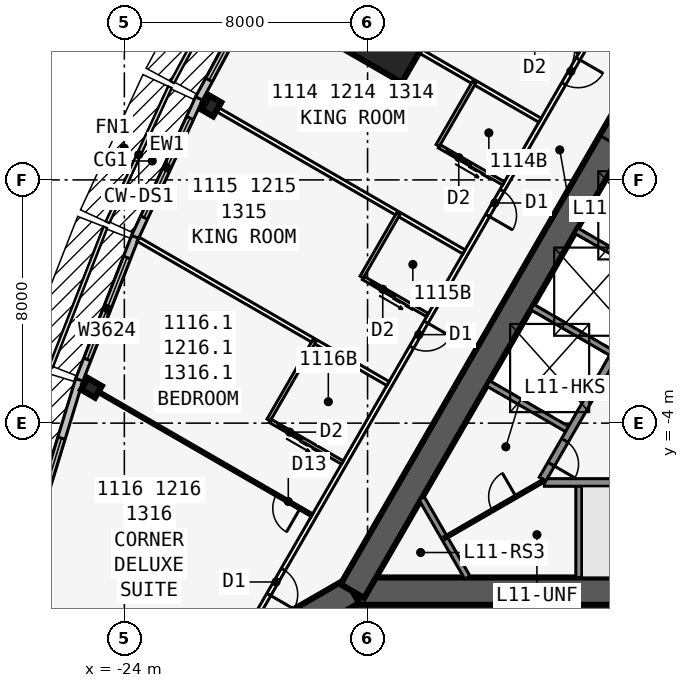
"""IFC4 building model, lengths in metres.
Left out: names, types, materials, properties, quantities, classifications, styles, units other than length and angle.
Written with IfcOpenShell. Run it as: python <this file> out.ifc"""

import sys

from ifc_helpers import new_model, si_unit, direction, frame, frame_2d, origin, origin_2d, place, context, subcontext, project, spatial, rectangle, i_section, extrude, element, fill, save


model = new_model("IFC4")
c1 = context("Model", 3, precision=1e-05, world=origin(), true_north=direction((0.0, 1.0)))
c2 = subcontext(c1, "Body", "Model", "MODEL_VIEW")
j1 = project(units=[si_unit("LENGTHUNIT", "METRE"), si_unit("PLANEANGLEUNIT", "RADIAN")], contexts=[c1])
p1 = place(None, origin())
s1 = spatial("IfcSite", under=j1, at=p1, CompositionType="ELEMENT")
p2 = place(p1, origin())
s2 = spatial("IfcBuilding", under=s1, at=p2, CompositionType="ELEMENT")
p3 = place(p2, frame((0.0, 0.0, 48.9)))
s3 = spatial("IfcBuildingStorey", under=s2, at=p3, CompositionType="ELEMENT", Elevation=48.9)
p4 = place(p3, frame((-16.5, -9.526, 0.0), z_axis=(0.0, 0.0, 1.0), x_axis=(1.0, 0.0, 0.0)))
e1 = element("IfcWall", 1, at=p4, inside=s3, PredefinedType="SHEAR", context=c2, shape_type="SweptSolid", body=[
    extrude(rectangle(XDim=33.0, YDim=0.9, at=frame_2d((16.5, 0.0))), origin(), (0.0, 0.0, 1.0), 3.4),
])
p5 = place(p4, frame((14.05, 0.0, 0.0)))
e2 = element("IfcOpeningElement", 2, at=p5, cuts=e1, PredefinedType="OPENING", context=c2, shape_type="SweptSolid", body=[
    extrude(rectangle(XDim=1.8, YDim=2.13, at=frame_2d((0.9, 1.065))), frame((0.0, 0.46, 0.0), z_axis=(0.0, -1.0, 0.0), x_axis=(1.0, 0.0, 0.0)), (0.0, 0.0, 1.0), 0.92),
])
p6 = place(p3, frame((-10.183, -5.951, 0.0), z_axis=(0.0, 0.0, 1.0), x_axis=(1.0, 0.0, 0.0)))
e3 = element("IfcWall", 3, at=p6, inside=s3, PredefinedType="SOLIDWALL", context=c2, shape_type="SweptSolid", body=[
    extrude(rectangle(XDim=7.633, YDim=0.25, at=frame_2d((3.816, 0.0))), origin(), (0.0, 0.0, 1.0), 3.235),
])
p7 = place(p3, frame((-9.05, -5.951, 0.0), z_axis=(0.0, 0.0, 1.0), x_axis=(0.0, -1.0, 0.0)))
e4 = element("IfcWall", 4, at=p7, inside=s3, PredefinedType="SOLIDWALL", context=c2, shape_type="SweptSolid", body=[
    extrude(rectangle(XDim=3.125, YDim=0.2, at=frame_2d((1.562, 0.0))), origin(), (0.0, 0.0, 1.0), 3.235),
])
p8 = place(p3, frame((0.0, 19.052, 0.0), z_axis=(0.0, 0.0, 1.0), x_axis=(-0.499999749417, -0.866025548458, 0.0)))
e5 = element("IfcWall", 5, at=p8, inside=s3, PredefinedType="SHEAR", context=c2, shape_type="SweptSolid", body=[
    extrude(rectangle(XDim=33.0, YDim=0.9, at=frame_2d((16.5, 0.0))), origin(), (0.0, 0.0, 1.0), 3.4),
])
p9 = place(p8, frame((14.15, 0.0, 0.0)))
e6 = element("IfcOpeningElement", 6, at=p9, cuts=e5, PredefinedType="OPENING", context=c2, shape_type="SweptSolid", body=[
    extrude(rectangle(XDim=1.8, YDim=2.13, at=frame_2d((0.9, 1.065))), frame((0.0, 0.46, 0.0), z_axis=(0.0, -1.0, 0.0), x_axis=(1.0, 0.0, 0.0)), (0.0, 0.0, 1.0), 0.92),
])
p10 = place(p8, frame((12.6, 0.0, 0.0)))
e7 = element("IfcOpeningElement", 7, at=p10, cuts=e5, PredefinedType="OPENING", context=c2, shape_type="SweptSolid", body=[
    extrude(rectangle(XDim=1.0, YDim=2.13, at=frame_2d((0.5, 1.065))), frame((0.0, 0.46, 0.0), z_axis=(0.0, -1.0, 0.0), x_axis=(1.0, 0.0, 0.0)), (0.0, 0.0, 1.0), 0.92),
])
p11 = place(p3, frame((-4.929, 3.365, 0.0), z_axis=(0.0, 0.0, 1.0), x_axis=(-0.499991433582, -0.866030349552, 0.0)))
e8 = element("IfcWall", 8, at=p11, inside=s3, PredefinedType="SOLIDWALL", context=c2, shape_type="SweptSolid", body=[
    extrude(rectangle(XDim=10.633, YDim=0.25, at=frame_2d((5.316, 0.0))), origin(), (0.0, 0.0, 1.0), 3.235),
])
p12 = place(p11, frame((9.164, 0.0, 0.0)))
e9 = element("IfcOpeningElement", 9, at=p12, cuts=e8, PredefinedType="OPENING", context=c2, shape_type="SweptSolid", body=[
    extrude(rectangle(XDim=0.9, YDim=2.13, at=frame_2d((0.45, 1.065))), frame((0.0, 0.135, 0.0), z_axis=(0.0, -1.0, 0.0), x_axis=(1.0, 0.0, 0.0)), (0.0, 0.0, 1.0), 0.27),
])
for number, where, z_axis, x_axis in (
    (10, (-6.429, 0.767, 0.0), (0.0, 0.0, 1.0), (-0.866, 0.5, 0.0)),
    (11, (-7.879, -1.744, 0.0), (0.0, 0.0, 1.0), (-0.866, 0.5, 0.0)),
    (12, (-9.329, -4.256, 0.0), (0.0, 0.0, 1.0), (-0.866, 0.5, 0.0)),
):
    element("IfcWall", number, at=place(p3, frame(where, z_axis=z_axis, x_axis=x_axis)), inside=s3, PredefinedType="SOLIDWALL", context=c2, shape_type="SweptSolid", body=[
        extrude(rectangle(XDim=3.125, YDim=0.2, at=frame_2d((1.562, 0.0))), origin(), (0.0, 0.0, 1.0), 3.235),
    ])
p13 = place(p3, frame((-16.5, -9.526, 0.0), z_axis=(0.0, 0.0, 1.0), x_axis=(-0.866031398331, -0.499989616998, 0.0)))
e13 = element("IfcWall", 13, at=p13, inside=s3, PredefinedType="SHEAR", context=c2, shape_type="SweptSolid", body=[
    extrude(rectangle(XDim=4.746, YDim=0.9, at=frame_2d((2.373, 0.0))), origin(), (0.0, 0.0, 1.0), 3.4),
])
p14 = place(p13, frame((1.8, 0.0, 0.0)))
e14 = element("IfcOpeningElement", 14, at=p14, cuts=e13, PredefinedType="OPENING", context=c2, shape_type="SweptSolid", body=[
    extrude(rectangle(XDim=1.8, YDim=2.13, at=frame_2d((0.9, 1.065))), frame((0.0, 0.46, 0.0), z_axis=(0.0, -1.0, 0.0), x_axis=(1.0, 0.0, 0.0)), (0.0, 0.0, 1.0), 0.92),
])
for number, where, z_axis, x_axis in (
    (15, (-21.137, 6.43, 0.0), (0.0, 0.0, 1.0), (-0.866, 0.5, 0.0)),
    (16, (-25.083, -2.839, 0.0), (0.0, 0.0, 1.0), (-0.5, -0.866, 0.0)),
):
    element("IfcColumn", number, at=place(p3, frame(where, z_axis=z_axis, x_axis=x_axis)), inside=s3, PredefinedType="COLUMN", context=c2, shape_type="SweptSolid", body=[
        extrude(i_section(OverallWidth=0.442, OverallDepth=0.531, WebThickness=0.066, FlangeThickness=0.106, at=origin_2d()), origin(), (0.0, 0.0, 1.0), 3.4),
    ])
p15 = place(p3, frame((-15.312, 8.84, 0.0), z_axis=(0.0, 0.0, 1.0), x_axis=(-0.866025403784, 0.5, 0.0)))
e17 = element("IfcColumn", 17, at=p15, inside=s3, PredefinedType="COLUMN", context=c2, shape_type="SweptSolid", body=[
    extrude(rectangle(XDim=2.4, YDim=2.4, at=origin_2d()), origin(), (0.0, 0.0, 1.0), 3.4),
])
p16 = place(p3, frame((-19.178, 11.077, 0.0), z_axis=(0.0, 0.0, 1.0), x_axis=(-0.473412820489, -0.880840678782, 0.0)))
e18 = element("IfcWall", 18, at=p16, inside=s3, PredefinedType="STANDARD", context=c2, shape_type="SweptSolid", body=[
    extrude(rectangle(XDim=5.002, YDim=0.25, at=frame_2d((2.501, 0.0))), origin(), (0.0, 0.0, 1.0), 3.235),
])
p17 = place(p16, frame((0.701, 0.0, 0.45)))
e19 = element("IfcOpeningElement", 19, at=p17, cuts=e18, PredefinedType="OPENING", context=c2, shape_type="SweptSolid", body=[
    extrude(rectangle(XDim=3.6, YDim=2.4, at=frame_2d((1.8, 1.2))), frame((0.0, 0.135, 0.0), z_axis=(0.0, -1.0, 0.0), x_axis=(1.0, 0.0, 0.0)), (0.0, 0.0, 1.0), 0.27),
])
p18 = place(p3, frame((-21.543, 6.678, 0.0), z_axis=(0.0, 0.0, 1.0), x_axis=(-0.419203100754, -0.907892482796, 0.0)))
e20 = element("IfcWall", 20, at=p18, inside=s3, PredefinedType="STANDARD", context=c2, shape_type="SweptSolid", body=[
    extrude(rectangle(XDim=5.021, YDim=0.25, at=frame_2d((2.51, 0.0))), origin(), (0.0, 0.0, 1.0), 3.235),
])
p19 = place(p18, frame((0.71, 0.0, 0.45)))
e21 = element("IfcOpeningElement", 21, at=p19, cuts=e20, PredefinedType="OPENING", context=c2, shape_type="SweptSolid", body=[
    extrude(rectangle(XDim=3.6, YDim=2.4, at=frame_2d((1.8, 1.2))), frame((0.0, 0.135, 0.0), z_axis=(0.0, -1.0, 0.0), x_axis=(1.0, 0.0, 0.0)), (0.0, 0.0, 1.0), 0.27),
])
p20 = place(p3, frame((-23.645, 2.126, 0.0), z_axis=(0.0, 0.0, 1.0), x_axis=(-0.364013463868, -0.931393685894, 0.0)))
e22 = element("IfcWall", 22, at=p20, inside=s3, PredefinedType="STANDARD", context=c2, shape_type="SweptSolid", body=[
    extrude(rectangle(XDim=5.058, YDim=0.25, at=frame_2d((2.529, 0.0))), origin(), (0.0, 0.0, 1.0), 3.235),
])
p21 = place(p20, frame((0.729, 0.0, 0.45)))
e23 = element("IfcOpeningElement", 23, at=p21, cuts=e22, PredefinedType="OPENING", context=c2, shape_type="SweptSolid", body=[
    extrude(rectangle(XDim=3.6, YDim=2.4, at=frame_2d((1.8, 1.2))), frame((0.0, 0.135, 0.0), z_axis=(0.0, -1.0, 0.0), x_axis=(1.0, 0.0, 0.0)), (0.0, 0.0, 1.0), 0.27),
])
p22 = place(p3, frame((-25.483, -2.575, 0.0), z_axis=(0.0, 0.0, 1.0), x_axis=(-0.2919790669, -0.956424709265, 0.0)))
e24 = element("IfcWall", 24, at=p22, inside=s3, PredefinedType="STANDARD", context=c2, shape_type="SweptSolid", body=[
    extrude(rectangle(XDim=8.211, YDim=0.25, at=frame_2d((4.105, 0.0))), origin(), (0.0, 0.0, 1.0), 3.235),
])
p23 = place(p22, frame((2.006, 0.0, 0.45)))
e25 = element("IfcOpeningElement", 25, at=p23, cuts=e24, PredefinedType="OPENING", context=c2, shape_type="SweptSolid", body=[
    extrude(rectangle(XDim=4.2, YDim=2.4, at=frame_2d((2.1, 1.2))), frame((0.0, 0.135, 0.0), z_axis=(0.0, -1.0, 0.0), x_axis=(1.0, 0.0, 0.0)), (0.0, 0.0, 1.0), 0.27),
])
p24 = place(p3, frame((-0.5, 22.836, 0.0), z_axis=(0.0, 0.0, 1.0), x_axis=(-0.500001677587, -0.866024435227, 0.0)))
e26 = element("IfcWall", 26, at=p24, inside=s3, PredefinedType="PARTITIONING", context=c2, shape_type="SweptSolid", body=[
    extrude(rectangle(XDim=39.054, YDim=0.15, at=frame_2d((19.527, 0.0))), origin(), (0.0, 0.0, 1.0), 3.235),
])
p25 = place(p24, frame((1.558, 0.0, 0.0)))
e27 = element("IfcOpeningElement", 27, at=p25, cuts=e26, PredefinedType="OPENING", context=c2, shape_type="SweptSolid", body=[
    extrude(rectangle(XDim=0.95, YDim=2.13, at=frame_2d((0.475, 1.065))), frame((0.0, 0.085, 0.0), z_axis=(0.0, -1.0, 0.0), x_axis=(1.0, 0.0, 0.0)), (0.0, 0.0, 1.0), 0.17),
])
p26 = place(p24, frame((12.752, 0.0, 0.0)))
e28 = element("IfcOpeningElement", 28, at=p26, cuts=e26, PredefinedType="OPENING", context=c2, shape_type="SweptSolid", body=[
    extrude(rectangle(XDim=0.95, YDim=2.13, at=frame_2d((0.475, 1.065))), frame((0.0, 0.085, 0.0), z_axis=(0.0, -1.0, 0.0), x_axis=(1.0, 0.0, 0.0)), (0.0, 0.0, 1.0), 0.17),
])
p27 = place(p24, frame((17.152, 0.0, 0.0)))
e29 = element("IfcOpeningElement", 29, at=p27, cuts=e26, PredefinedType="OPENING", context=c2, shape_type="SweptSolid", body=[
    extrude(rectangle(XDim=0.95, YDim=2.13, at=frame_2d((0.475, 1.065))), frame((0.0, 0.085, 0.0), z_axis=(0.0, -1.0, 0.0), x_axis=(1.0, 0.0, 0.0)), (0.0, 0.0, 1.0), 0.17),
])
p28 = place(p24, frame((22.152, 0.0, 0.0)))
e30 = element("IfcOpeningElement", 30, at=p28, cuts=e26, PredefinedType="OPENING", context=c2, shape_type="SweptSolid", body=[
    extrude(rectangle(XDim=0.95, YDim=2.13, at=frame_2d((0.475, 1.065))), frame((0.0, 0.085, 0.0), z_axis=(0.0, -1.0, 0.0), x_axis=(1.0, 0.0, 0.0)), (0.0, 0.0, 1.0), 0.17),
])
p29 = place(p24, frame((27.152, 0.0, 0.0)))
e31 = element("IfcOpeningElement", 31, at=p29, cuts=e26, PredefinedType="OPENING", context=c2, shape_type="SweptSolid", body=[
    extrude(rectangle(XDim=0.95, YDim=2.13, at=frame_2d((0.475, 1.065))), frame((0.0, 0.085, 0.0), z_axis=(0.0, -1.0, 0.0), x_axis=(1.0, 0.0, 0.0)), (0.0, 0.0, 1.0), 0.17),
])
p30 = place(p24, frame((36.546, 0.0, 0.0)))
e32 = element("IfcOpeningElement", 32, at=p30, cuts=e26, PredefinedType="OPENING", context=c2, shape_type="SweptSolid", body=[
    extrude(rectangle(XDim=0.95, YDim=2.13, at=frame_2d((0.475, 1.065))), frame((0.0, 0.085, 0.0), z_axis=(0.0, -1.0, 0.0), x_axis=(1.0, 0.0, 0.0)), (0.0, 0.0, 1.0), 0.17),
])
p31 = place(p3, frame((-10.329, 5.963, 0.0), z_axis=(0.0, 0.0, 1.0), x_axis=(-0.866021688545, 0.500006434927, 0.0)))
e33 = element("IfcWall", 33, at=p31, inside=s3, PredefinedType="PARTITIONING", context=c2, shape_type="SweptSolid", body=[
    extrude(rectangle(XDim=10.096, YDim=0.15, at=frame_2d((5.048, 0.0))), origin(), (0.0, 0.0, 1.0), 2.389),
])
p32 = place(p3, frame((-12.829, 1.633, 0.0), z_axis=(0.0, 0.0, 1.0), x_axis=(-0.866026934769, 0.499997348248, 0.0)))
e34 = element("IfcWall", 34, at=p32, inside=s3, PredefinedType="PARTITIONING", context=c2, shape_type="SweptSolid", body=[
    extrude(rectangle(XDim=9.943, YDim=0.15, at=frame_2d((4.971, 0.0))), origin(), (0.0, 0.0, 1.0), 2.389),
])
p33 = place(p3, frame((-15.329, -2.697, 0.0), z_axis=(0.0, 0.0, 1.0), x_axis=(-0.866018409083, 0.500012114982, 0.0)))
e35 = element("IfcWall", 35, at=p33, inside=s3, PredefinedType="PARTITIONING", context=c2, shape_type="SweptSolid", body=[
    extrude(rectangle(XDim=9.485, YDim=0.15, at=frame_2d((4.742, 0.0))), origin(), (0.0, 0.0, 1.0), 2.389),
])
p34 = place(p3, frame((-17.829, -7.027, 0.0), z_axis=(0.0, 0.0, 1.0), x_axis=(-0.866032659912, 0.499987431809, 0.0)))
e36 = element("IfcWall", 36, at=p34, inside=s3, PredefinedType="PARTITIONING", context=c2, shape_type="SweptSolid", body=[
    extrude(rectangle(XDim=8.72, YDim=0.1, at=frame_2d((4.36, 0.0))), origin(), (0.0, 0.0, 1.0), 2.389),
])
p35 = place(p34, frame((0.45, 0.0, 0.0)))
e37 = element("IfcOpeningElement", 37, at=p35, cuts=e36, PredefinedType="OPENING", context=c2, shape_type="SweptSolid", body=[
    extrude(rectangle(XDim=0.9, YDim=2.13, at=frame_2d((0.45, 1.065))), frame((0.0, 0.06, 0.0), z_axis=(0.0, -1.0, 0.0), x_axis=(1.0, 0.0, 0.0)), (0.0, 0.0, 1.0), 0.12),
])
p36 = place(p3, frame((-9.029, 8.215, 0.0), z_axis=(0.0, 0.0, 1.0), x_axis=(-0.866023955769, 0.500002508028, 0.0)))
e38 = element("IfcWall", 38, at=p36, inside=s3, PredefinedType="PLUMBINGWALL", context=c2, shape_type="SweptSolid", body=[
    extrude(rectangle(XDim=2.44, YDim=0.12, at=frame_2d((1.22, 0.0))), origin(), (0.0, 0.0, 1.0), 3.235),
])
p37 = place(p36, frame((1.25, 0.0, 0.0)))
e39 = element("IfcOpeningElement", 39, at=p37, cuts=e38, PredefinedType="OPENING", context=c2, shape_type="SweptSolid", body=[
    extrude(rectangle(XDim=0.9, YDim=2.13, at=frame_2d((0.45, 1.065))), frame((0.0, 0.07, 0.0), z_axis=(0.0, -1.0, 0.0), x_axis=(1.0, 0.0, 0.0)), (0.0, 0.0, 1.0), 0.14),
])
p38 = place(p3, frame((-12.493, 7.213, 0.0), z_axis=(0.0, 0.0, 1.0), x_axis=(-0.500077600433, -0.865980596518, 0.0)))
e40 = element("IfcWall", 40, at=p38, inside=s3, PredefinedType="PLUMBINGWALL", context=c2, shape_type="SweptSolid", body=[
    extrude(rectangle(XDim=2.4, YDim=0.12, at=frame_2d((1.2, 0.0))), origin(), (0.0, 0.0, 1.0), 3.235),
])
p39 = place(p3, frame((-11.529, 3.885, 0.0), z_axis=(0.0, 0.0, 1.0), x_axis=(-0.866023955769, 0.500002508028, 0.0)))
e41 = element("IfcWall", 41, at=p39, inside=s3, PredefinedType="PLUMBINGWALL", context=c2, shape_type="SweptSolid", body=[
    extrude(rectangle(XDim=2.44, YDim=0.12, at=frame_2d((1.22, 0.0))), origin(), (0.0, 0.0, 1.0), 3.235),
])
p40 = place(p39, frame((1.25, 0.0, 0.0)))
e42 = element("IfcOpeningElement", 42, at=p40, cuts=e41, PredefinedType="OPENING", context=c2, shape_type="SweptSolid", body=[
    extrude(rectangle(XDim=0.9, YDim=2.13, at=frame_2d((0.45, 1.065))), frame((0.0, 0.07, 0.0), z_axis=(0.0, -1.0, 0.0), x_axis=(1.0, 0.0, 0.0)), (0.0, 0.0, 1.0), 0.14),
])
p41 = place(p3, frame((-14.993, 2.883, 0.0), z_axis=(0.0, 0.0, 1.0), x_axis=(-0.500077600433, -0.865980596518, 0.0)))
e43 = element("IfcWall", 43, at=p41, inside=s3, PredefinedType="PLUMBINGWALL", context=c2, shape_type="SweptSolid", body=[
    extrude(rectangle(XDim=2.4, YDim=0.12, at=frame_2d((1.2, 0.0))), origin(), (0.0, 0.0, 1.0), 3.235),
])
p42 = place(p3, frame((-14.029, -0.445, 0.0), z_axis=(0.0, 0.0, 1.0), x_axis=(-0.866023955769, 0.500002508028, 0.0)))
e44 = element("IfcWall", 44, at=p42, inside=s3, PredefinedType="PLUMBINGWALL", context=c2, shape_type="SweptSolid", body=[
    extrude(rectangle(XDim=2.44, YDim=0.12, at=frame_2d((1.22, 0.0))), origin(), (0.0, 0.0, 1.0), 3.235),
])
p43 = place(p42, frame((1.25, 0.0, 0.0)))
e45 = element("IfcOpeningElement", 45, at=p43, cuts=e44, PredefinedType="OPENING", context=c2, shape_type="SweptSolid", body=[
    extrude(rectangle(XDim=0.9, YDim=2.13, at=frame_2d((0.45, 1.065))), frame((0.0, 0.07, 0.0), z_axis=(0.0, -1.0, 0.0), x_axis=(1.0, 0.0, 0.0)), (0.0, 0.0, 1.0), 0.14),
])
p44 = place(p3, frame((-17.753, -1.297, 0.0), z_axis=(0.0, 0.0, 1.0), x_axis=(-0.499990139034, -0.866031096941, 0.0)))
e46 = element("IfcWall", 46, at=p44, inside=s3, PredefinedType="PLUMBINGWALL", context=c2, shape_type="SweptSolid", body=[
    extrude(rectangle(XDim=3.0, YDim=0.12, at=frame_2d((1.5, 0.0))), origin(), (0.0, 0.0, 1.0), 3.235),
])
p45 = place(p3, frame((-16.829, -5.295, 0.0), z_axis=(0.0, 0.0, 1.0), x_axis=(-0.866035715982, 0.499982138324, 0.0)))
e47 = element("IfcWall", 47, at=p45, inside=s3, PredefinedType="PLUMBINGWALL", context=c2, shape_type="SweptSolid", body=[
    extrude(rectangle(XDim=2.74, YDim=0.12, at=frame_2d((1.37, 0.0))), origin(), (0.0, 0.0, 1.0), 3.235),
])
p46 = place(p45, frame((1.55, 0.0, 0.0)))
e48 = element("IfcOpeningElement", 48, at=p46, cuts=e47, PredefinedType="OPENING", context=c2, shape_type="SweptSolid", body=[
    extrude(rectangle(XDim=0.9, YDim=2.13, at=frame_2d((0.45, 1.065))), frame((0.0, 0.07, 0.0), z_axis=(0.0, -1.0, 0.0), x_axis=(1.0, 0.0, 0.0)), (0.0, 0.0, 1.0), 0.14),
])
p47 = place(p3, frame((-12.719, -9.076, 0.0), z_axis=(0.0, 0.0, 1.0), x_axis=(-0.499952404951, 0.866052881055, 0.0)))
e49 = element("IfcWall", 49, at=p47, inside=s3, PredefinedType="SOLIDWALL", context=c2, shape_type="SweptSolid", body=[
    extrude(rectangle(XDim=3.002, YDim=0.2, at=frame_2d((1.501, 0.0))), origin(), (0.0, 0.0, 1.0), 3.235),
])
p48 = place(p3, frame((-13.469, -7.776, 0.0), z_axis=(0.0, 0.0, 1.0), x_axis=(0.866021898093, 0.500006071987, 0.0)))
e50 = element("IfcWall", 50, at=p48, inside=s3, PredefinedType="PARTITIONING", context=c2, shape_type="SweptSolid", body=[
    extrude(rectangle(XDim=3.775, YDim=0.1, at=frame_2d((1.888, 0.0))), origin(), (0.0, 0.0, 1.0), 3.235),
])
p49 = place(p48, frame((1.815, 0.0, 0.0)))
e51 = element("IfcOpeningElement", 51, at=p49, cuts=e50, PredefinedType="OPENING", context=c2, shape_type="SweptSolid", body=[
    extrude(rectangle(XDim=0.9, YDim=2.13, at=frame_2d((0.45, 1.065))), frame((0.0, 0.06, 0.0), z_axis=(0.0, -1.0, 0.0), x_axis=(1.0, 0.0, 0.0)), (0.0, 0.0, 1.0), 0.12),
])
p50 = place(p17, origin())
e52 = element("IfcWindow", 52, at=p50, inside=s3, PartitioningType="SINGLE_PANEL", PredefinedType="WINDOW", context=c2, shape_type="SweptSolid", body=[
    extrude(rectangle(XDim=3.6, YDim=2.4, at=frame_2d((1.8, 1.2))), frame((0.0, 0.03, 0.0), z_axis=(0.0, -1.0, 0.0), x_axis=(1.0, 0.0, 0.0)), (0.0, 0.0, 1.0), 0.06),
])
fill(e19, e52)
p51 = place(p19, origin())
e53 = element("IfcWindow", 53, at=p51, inside=s3, PartitioningType="SINGLE_PANEL", PredefinedType="WINDOW", context=c2, shape_type="SweptSolid", body=[
    extrude(rectangle(XDim=3.6, YDim=2.4, at=frame_2d((1.8, 1.2))), frame((0.0, 0.03, 0.0), z_axis=(0.0, -1.0, 0.0), x_axis=(1.0, 0.0, 0.0)), (0.0, 0.0, 1.0), 0.06),
])
fill(e21, e53)
p52 = place(p21, origin())
e54 = element("IfcWindow", 54, at=p52, inside=s3, PartitioningType="SINGLE_PANEL", PredefinedType="WINDOW", context=c2, shape_type="SweptSolid", body=[
    extrude(rectangle(XDim=3.6, YDim=2.4, at=frame_2d((1.8, 1.2))), frame((0.0, 0.03, 0.0), z_axis=(0.0, -1.0, 0.0), x_axis=(1.0, 0.0, 0.0)), (0.0, 0.0, 1.0), 0.06),
])
fill(e23, e54)
p53 = place(p23, origin())
e55 = element("IfcWindow", 55, at=p53, inside=s3, PartitioningType="SINGLE_PANEL", PredefinedType="WINDOW", context=c2, shape_type="SweptSolid", body=[
    extrude(rectangle(XDim=4.2, YDim=2.4, at=frame_2d((2.1, 1.2))), frame((0.0, 0.03, 0.0), z_axis=(0.0, -1.0, 0.0), x_axis=(1.0, 0.0, 0.0)), (0.0, 0.0, 1.0), 0.06),
])
fill(e25, e55)
p54 = place(p35, origin())
e56 = element("IfcDoor", 56, at=p54, inside=s3, OperationType="SINGLE_SWING_LEFT", PredefinedType="DOOR", context=c2, shape_type="SweptSolid", body=[
    extrude(rectangle(XDim=0.9, YDim=2.13, at=frame_2d((0.45, 1.065))), frame((0.0, 0.025, 0.0), z_axis=(0.0, -1.0, 0.0), x_axis=(1.0, 0.0, 0.0)), (0.0, 0.0, 1.0), 0.05),
])
fill(e37, e56)
p55 = place(p27, origin())
e57 = element("IfcDoor", 57, at=p55, inside=s3, OperationType="SINGLE_SWING_LEFT", PredefinedType="DOOR", context=c2, shape_type="SweptSolid", body=[
    extrude(rectangle(XDim=0.95, YDim=2.13, at=frame_2d((0.475, 1.065))), frame((0.0, 0.025, 0.0), z_axis=(0.0, -1.0, 0.0), x_axis=(1.0, 0.0, 0.0)), (0.0, 0.0, 1.0), 0.05),
])
fill(e29, e57)
p56 = place(p40, origin())
e58 = element("IfcDoor", 58, at=p56, inside=s3, OperationType="SLIDING_TO_LEFT", PredefinedType="DOOR", context=c2, shape_type="SweptSolid", body=[
    extrude(rectangle(XDim=0.9, YDim=2.13, at=frame_2d((0.45, 1.065))), frame((0.0, 0.025, 0.0), z_axis=(0.0, -1.0, 0.0), x_axis=(1.0, 0.0, 0.0)), (0.0, 0.0, 1.0), 0.05),
])
fill(e42, e58)
p57 = place(p28, origin())
e59 = element("IfcDoor", 59, at=p57, inside=s3, OperationType="SINGLE_SWING_RIGHT", PredefinedType="DOOR", context=c2, shape_type="SweptSolid", body=[
    extrude(rectangle(XDim=0.95, YDim=2.13, at=frame_2d((0.475, 1.065))), frame((0.0, 0.025, 0.0), z_axis=(0.0, -1.0, 0.0), x_axis=(1.0, 0.0, 0.0)), (0.0, 0.0, 1.0), 0.05),
])
fill(e30, e59)
p58 = place(p43, origin())
e60 = element("IfcDoor", 60, at=p58, inside=s3, OperationType="SLIDING_TO_LEFT", PredefinedType="DOOR", context=c2, shape_type="SweptSolid", body=[
    extrude(rectangle(XDim=0.9, YDim=2.13, at=frame_2d((0.45, 1.065))), frame((0.0, 0.025, 0.0), z_axis=(0.0, -1.0, 0.0), x_axis=(1.0, 0.0, 0.0)), (0.0, 0.0, 1.0), 0.05),
])
fill(e45, e60)
p59 = place(p29, origin())
e61 = element("IfcDoor", 61, at=p59, inside=s3, OperationType="SINGLE_SWING_LEFT", PredefinedType="DOOR", context=c2, shape_type="SweptSolid", body=[
    extrude(rectangle(XDim=0.95, YDim=2.13, at=frame_2d((0.475, 1.065))), frame((0.0, 0.025, 0.0), z_axis=(0.0, -1.0, 0.0), x_axis=(1.0, 0.0, 0.0)), (0.0, 0.0, 1.0), 0.05),
])
fill(e31, e61)
p60 = place(p46, origin())
e62 = element("IfcDoor", 62, at=p60, inside=s3, OperationType="SLIDING_TO_LEFT", PredefinedType="DOOR", context=c2, shape_type="SweptSolid", body=[
    extrude(rectangle(XDim=0.9, YDim=2.13, at=frame_2d((0.45, 1.065))), frame((0.0, 0.025, 0.0), z_axis=(0.0, -1.0, 0.0), x_axis=(1.0, 0.0, 0.0)), (0.0, 0.0, 1.0), 0.05),
])
fill(e48, e62)
p61 = place(p30, origin())
e63 = element("IfcDoor", 63, at=p61, inside=s3, OperationType="SINGLE_SWING_RIGHT", PredefinedType="DOOR", context=c2, shape_type="SweptSolid", body=[
    extrude(rectangle(XDim=0.95, YDim=2.13, at=frame_2d((0.475, 1.065))), frame((0.0, 0.025, 0.0), z_axis=(0.0, -1.0, 0.0), x_axis=(1.0, 0.0, 0.0)), (0.0, 0.0, 1.0), 0.05),
])
fill(e32, e63)
p62 = place(p12, origin())
e64 = element("IfcDoor", 64, at=p62, inside=s3, OperationType="SINGLE_SWING_RIGHT", PredefinedType="DOOR", context=c2, shape_type="SweptSolid", body=[
    extrude(rectangle(XDim=0.9, YDim=2.13, at=frame_2d((0.45, 1.065))), frame((0.0, 0.025, 0.0), z_axis=(0.0, -1.0, 0.0), x_axis=(1.0, 0.0, 0.0)), (0.0, 0.0, 1.0), 0.05),
])
fill(e9, e64)
p63 = place(p49, origin())
e65 = element("IfcDoor", 65, at=p63, inside=s3, OperationType="SINGLE_SWING_RIGHT", PredefinedType="DOOR", context=c2, shape_type="SweptSolid", body=[
    extrude(rectangle(XDim=0.9, YDim=2.13, at=frame_2d((0.45, 1.065))), frame((0.0, 0.025, 0.0), z_axis=(0.0, -1.0, 0.0), x_axis=(1.0, 0.0, 0.0)), (0.0, 0.0, 1.0), 0.05),
])
fill(e51, e65)
save(model, sys.argv[1])
